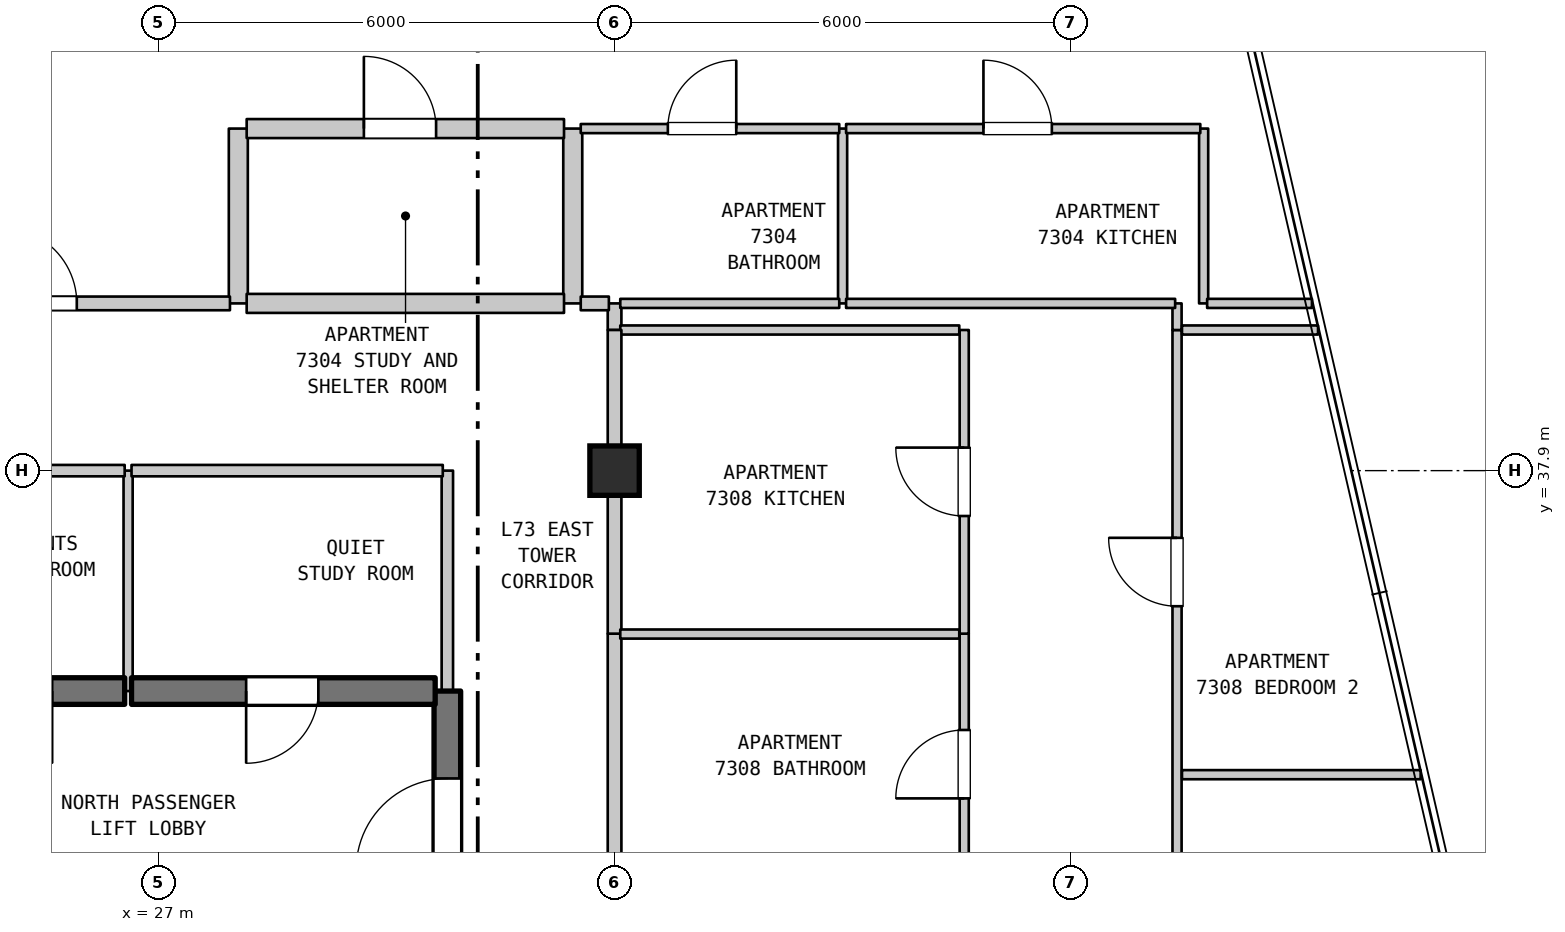
"""IFC4 building model, lengths in metres.
Left out: names, types, materials, properties, quantities, classifications, styles, units other than length and angle.
Written with IfcOpenShell. Run it as: python <this file> out.ifc"""

import sys

from ifc_helpers import new_model, si_unit, direction, frame, frame_2d, origin, origin_2d, place, context, subcontext, project, spatial, rectangle, extrude, element, fill, save


model = new_model("IFC4")
c1 = context("Model", 3, precision=1e-05, world=origin(), true_north=direction((0.0, 1.0)))
c2 = subcontext(c1, "Body", "Model", "MODEL_VIEW")
j1 = project(units=[si_unit("LENGTHUNIT", "METRE"), si_unit("PLANEANGLEUNIT", "RADIAN")], contexts=[c1])
p1 = place(None, origin())
s1 = spatial("IfcSite", under=j1, at=p1, CompositionType="ELEMENT")
p2 = place(p1, origin())
s2 = spatial("IfcBuilding", under=s1, at=p2, CompositionType="ELEMENT")
p3 = place(p2, frame((0.0, 0.0, 291.7)))
s3 = spatial("IfcBuildingStorey", under=s2, at=p3, CompositionType="ELEMENT", Elevation=291.7)
p4 = place(p3, frame((33.0, 37.9, 0.0), z_axis=(0.0, 0.0, 1.0), x_axis=(1.0, 0.0, 0.0)))
e1 = element("IfcColumn", 1, at=p4, inside=s3, PredefinedType="COLUMN", context=c2, shape_type="SweptSolid", body=[
    extrude(rectangle(XDim=0.65, YDim=0.65, at=origin_2d()), origin(), (0.0, 0.0, 1.0), 3.7),
])
p5 = place(p3, frame((26.6, 35.0, 0.0), z_axis=(0.0, 0.0, 1.0), x_axis=(0.0, 1.0, 0.0)))
e2 = element("IfcWall", 2, at=p5, inside=s3, PredefinedType="PARTITIONING", context=c2, shape_type="SweptSolid", body=[
    extrude(rectangle(XDim=2.9, YDim=0.12, at=frame_2d((1.45, 0.0))), origin(), (0.0, 0.0, 1.0), 3.39),
])
p6 = place(p3, frame((28.05, 40.1, 0.0), z_axis=(0.0, 0.0, 1.0), x_axis=(0.0, 1.0, 0.0)))
e3 = element("IfcWall", 3, at=p6, inside=s3, PredefinedType="STANDARD", context=c2, shape_type="SweptSolid", body=[
    extrude(rectangle(XDim=2.3, YDim=0.25, at=frame_2d((1.15, 0.0))), origin(), (0.0, 0.0, 1.0), 3.39),
])
p7 = place(p3, frame((30.8, 31.5, 0.0), z_axis=(0.0, 0.0, 1.0), x_axis=(0.0, 1.0, 0.0)))
e4 = element("IfcWall", 4, at=p7, inside=s3, PredefinedType="SHEAR", context=c2, shape_type="SweptSolid", body=[
    extrude(rectangle(XDim=3.5, YDim=0.35, at=frame_2d((1.75, 0.0))), origin(), (0.0, 0.0, 1.0), 3.39),
])
p8 = place(p7, frame((1.15, 0.0, 0.0)))
e5 = element("IfcOpeningElement", 5, at=p8, cuts=e4, PredefinedType="OPENING", context=c2, shape_type="SweptSolid", body=[
    extrude(rectangle(XDim=1.2, YDim=2.2, at=frame_2d((0.6, 1.1))), frame((0.0, 0.185, 0.0), z_axis=(0.0, -1.0, 0.0), x_axis=(1.0, 0.0, 0.0)), (0.0, 0.0, 1.0), 0.37),
])
p9 = place(p3, frame((30.8, 35.0, 0.0), z_axis=(0.0, 0.0, 1.0), x_axis=(0.0, 1.0, 0.0)))
e6 = element("IfcWall", 6, at=p9, inside=s3, PredefinedType="STANDARD", context=c2, shape_type="SweptSolid", body=[
    extrude(rectangle(XDim=2.9, YDim=0.15, at=frame_2d((1.45, 0.0))), origin(), (0.0, 0.0, 1.0), 3.39),
])
p10 = place(p3, frame((32.45, 40.1, 0.0), z_axis=(0.0, 0.0, 1.0), x_axis=(0.0, 1.0, 0.0)))
e7 = element("IfcWall", 7, at=p10, inside=s3, PredefinedType="STANDARD", context=c2, shape_type="SweptSolid", body=[
    extrude(rectangle(XDim=2.3, YDim=0.25, at=frame_2d((1.15, 0.0))), origin(), (0.0, 0.0, 1.0), 3.39),
])
p11 = place(p3, frame((33.0, 32.465, 0.0), z_axis=(0.0, 0.0, 1.0), x_axis=(0.0, 1.0, 0.0)))
e8 = element("IfcWall", 8, at=p11, inside=s3, PredefinedType="STANDARD", context=c2, shape_type="SweptSolid", body=[
    extrude(rectangle(XDim=3.29, YDim=0.18, at=frame_2d((1.645, 0.0))), origin(), (0.0, 0.0, 1.0), 2.89),
])
p12 = place(p3, frame((33.0, 35.755, 0.0), z_axis=(0.0, 0.0, 1.0), x_axis=(0.0, 1.0, 0.0)))
e9 = element("IfcWall", 9, at=p12, inside=s3, PredefinedType="STANDARD", context=c2, shape_type="SweptSolid", body=[
    extrude(rectangle(XDim=2.145, YDim=0.18, at=frame_2d((1.073, 0.0))), origin(), (0.0, 0.0, 1.0), 2.89),
])
p13 = place(p3, frame((33.0, 39.75, 0.0), z_axis=(0.0, 0.0, 1.0), x_axis=(0.0, 1.0, 0.0)))
e10 = element("IfcWall", 10, at=p13, inside=s3, PredefinedType="STANDARD", context=c2, shape_type="SweptSolid", body=[
    extrude(rectangle(XDim=0.35, YDim=0.18, at=frame_2d((0.175, 0.0))), origin(), (0.0, 0.0, 1.0), 3.39),
])
p14 = place(p3, frame((36.0, 40.1, 0.0), z_axis=(0.0, 0.0, 1.0), x_axis=(0.0, 1.0, 0.0)))
e11 = element("IfcWall", 11, at=p14, inside=s3, PredefinedType="PARTITIONING", context=c2, shape_type="SweptSolid", body=[
    extrude(rectangle(XDim=2.3, YDim=0.12, at=frame_2d((1.15, 0.0))), origin(), (0.0, 0.0, 1.0), 3.39),
])
p15 = place(p3, frame((37.6, 32.465, 0.0), z_axis=(0.0, 0.0, 1.0), x_axis=(0.0, 1.0, 0.0)))
e12 = element("IfcWall", 12, at=p15, inside=s3, PredefinedType="PARTITIONING", context=c2, shape_type="SweptSolid", body=[
    extrude(rectangle(XDim=3.29, YDim=0.12, at=frame_2d((1.645, 0.0))), origin(), (0.0, 0.0, 1.0), 3.39),
])
p16 = place(p15, frame((1.123, 0.0, 0.0)))
e13 = element("IfcOpeningElement", 13, at=p16, cuts=e12, PredefinedType="OPENING", context=c2, shape_type="SweptSolid", body=[
    extrude(rectangle(XDim=0.9, YDim=2.1, at=frame_2d((0.45, 1.05))), frame((0.0, 0.07, 0.0), z_axis=(0.0, -1.0, 0.0), x_axis=(1.0, 0.0, 0.0)), (0.0, 0.0, 1.0), 0.14),
])
p17 = place(p3, frame((37.6, 35.755, 0.0), z_axis=(0.0, 0.0, 1.0), x_axis=(0.0, 1.0, 0.0)))
e14 = element("IfcWall", 14, at=p17, inside=s3, PredefinedType="PARTITIONING", context=c2, shape_type="SweptSolid", body=[
    extrude(rectangle(XDim=3.995, YDim=0.12, at=frame_2d((1.998, 0.0))), origin(), (0.0, 0.0, 1.0), 3.39),
])
p18 = place(p17, frame((1.548, 0.0, 0.0)))
e15 = element("IfcOpeningElement", 15, at=p18, cuts=e14, PredefinedType="OPENING", context=c2, shape_type="SweptSolid", body=[
    extrude(rectangle(XDim=0.9, YDim=2.15, at=frame_2d((0.45, 1.075))), frame((0.0, 0.07, 0.0), z_axis=(0.0, -1.0, 0.0), x_axis=(1.0, 0.0, 0.0)), (0.0, 0.0, 1.0), 0.14),
])
p19 = place(p3, frame((40.4, 28.0, 0.0), z_axis=(0.0, 0.0, 1.0), x_axis=(0.0, 1.0, 0.0)))
e16 = element("IfcWall", 16, at=p19, inside=s3, PredefinedType="PARTITIONING", context=c2, shape_type="SweptSolid", body=[
    extrude(rectangle(XDim=11.75, YDim=0.12, at=frame_2d((5.875, 0.0))), origin(), (0.0, 0.0, 1.0), 3.39),
])
p20 = place(p19, frame((2.591, 0.0, 0.0)))
e17 = element("IfcOpeningElement", 17, at=p20, cuts=e16, PredefinedType="OPENING", context=c2, shape_type="SweptSolid", body=[
    extrude(rectangle(XDim=0.9, YDim=2.15, at=frame_2d((0.45, 1.075))), frame((0.0, 0.07, 0.0), z_axis=(0.0, -1.0, 0.0), x_axis=(1.0, 0.0, 0.0)), (0.0, 0.0, 1.0), 0.14),
])
p21 = place(p19, frame((8.116, 0.0, 0.0)))
e18 = element("IfcOpeningElement", 18, at=p21, cuts=e16, PredefinedType="OPENING", context=c2, shape_type="SweptSolid", body=[
    extrude(rectangle(XDim=0.9, YDim=2.15, at=frame_2d((0.45, 1.075))), frame((0.0, 0.07, 0.0), z_axis=(0.0, -1.0, 0.0), x_axis=(1.0, 0.0, 0.0)), (0.0, 0.0, 1.0), 0.14),
])
p22 = place(p3, frame((40.4, 39.75, 0.0), z_axis=(0.0, 0.0, 1.0), x_axis=(0.0, 1.0, 0.0)))
e19 = element("IfcWall", 19, at=p22, inside=s3, PredefinedType="PARTITIONING", context=c2, shape_type="SweptSolid", body=[
    extrude(rectangle(XDim=0.35, YDim=0.12, at=frame_2d((0.175, 0.0))), origin(), (0.0, 0.0, 1.0), 3.39),
])
p23 = place(p3, frame((40.75, 40.1, 0.0), z_axis=(0.0, 0.0, 1.0), x_axis=(0.0, 1.0, 0.0)))
e20 = element("IfcWall", 20, at=p23, inside=s3, PredefinedType="PARTITIONING", context=c2, shape_type="SweptSolid", body=[
    extrude(rectangle(XDim=2.3, YDim=0.12, at=frame_2d((1.15, 0.0))), origin(), (0.0, 0.0, 1.0), 3.39),
])
p24 = place(p3, frame((40.465, 33.9, 0.0), z_axis=(0.0, 0.0, 1.0), x_axis=(1.0, 0.0, 0.0)))
e21 = element("IfcWall", 21, at=p24, inside=s3, PredefinedType="PARTITIONING", context=c2, shape_type="SweptSolid", body=[
    extrude(rectangle(XDim=3.14, YDim=0.12, at=frame_2d((1.57, 0.0))), origin(), (0.0, 0.0, 1.0), 3.39),
])
p25 = place(p3, frame((23.96, 35.0, 0.0), z_axis=(0.0, 0.0, 1.0), x_axis=(1.0, 0.0, 0.0)))
e22 = element("IfcWall", 22, at=p25, inside=s3, PredefinedType="SHEAR", context=c2, shape_type="SweptSolid", body=[
    extrude(rectangle(XDim=2.595, YDim=0.35, at=frame_2d((1.297, 0.0))), origin(), (0.0, 0.0, 1.0), 3.39),
])
p26 = place(p25, frame((0.691, 0.0, 0.0)))
e23 = element("IfcOpeningElement", 23, at=p26, cuts=e22, PredefinedType="OPENING", context=c2, shape_type="SweptSolid", body=[
    extrude(rectangle(XDim=0.95, YDim=2.15, at=frame_2d((0.475, 1.075))), frame((0.0, 0.185, 0.0), z_axis=(0.0, -1.0, 0.0), x_axis=(1.0, 0.0, 0.0)), (0.0, 0.0, 1.0), 0.37),
])
p27 = place(p3, frame((26.645, 35.0, 0.0), z_axis=(0.0, 0.0, 1.0), x_axis=(1.0, 0.0, 0.0)))
e24 = element("IfcWall", 24, at=p27, inside=s3, PredefinedType="SHEAR", context=c2, shape_type="SweptSolid", body=[
    extrude(rectangle(XDim=3.995, YDim=0.35, at=frame_2d((1.998, 0.0))), origin(), (0.0, 0.0, 1.0), 3.39),
])
p28 = place(p27, frame((1.508, 0.0, 0.0)))
e25 = element("IfcOpeningElement", 25, at=p28, cuts=e24, PredefinedType="OPENING", context=c2, shape_type="SweptSolid", body=[
    extrude(rectangle(XDim=0.95, YDim=2.15, at=frame_2d((0.475, 1.075))), frame((0.0, 0.185, 0.0), z_axis=(0.0, -1.0, 0.0), x_axis=(1.0, 0.0, 0.0)), (0.0, 0.0, 1.0), 0.37),
])
p29 = place(p3, frame((33.075, 35.75, 0.0), z_axis=(0.0, 0.0, 1.0), x_axis=(1.0, 0.0, 0.0)))
e26 = element("IfcWall", 26, at=p29, inside=s3, PredefinedType="PARTITIONING", context=c2, shape_type="SweptSolid", body=[
    extrude(rectangle(XDim=4.46, YDim=0.12, at=frame_2d((2.23, 0.0))), origin(), (0.0, 0.0, 1.0), 3.39),
])
p30 = place(p3, frame((23.96, 37.9, 0.0), z_axis=(0.0, 0.0, 1.0), x_axis=(1.0, 0.0, 0.0)))
e27 = element("IfcWall", 27, at=p30, inside=s3, PredefinedType="STANDARD", context=c2, shape_type="SweptSolid", body=[
    extrude(rectangle(XDim=2.595, YDim=0.15, at=frame_2d((1.297, 0.0))), origin(), (0.0, 0.0, 1.0), 2.89),
])
p31 = place(p3, frame((26.645, 37.9, 0.0), z_axis=(0.0, 0.0, 1.0), x_axis=(1.0, 0.0, 0.0)))
e28 = element("IfcWall", 28, at=p31, inside=s3, PredefinedType="STANDARD", context=c2, shape_type="SweptSolid", body=[
    extrude(rectangle(XDim=4.095, YDim=0.15, at=frame_2d((2.047, 0.0))), origin(), (0.0, 0.0, 1.0), 2.89),
])
p32 = place(p3, frame((33.075, 39.75, 0.0), z_axis=(0.0, 0.0, 1.0), x_axis=(1.0, 0.0, 0.0)))
e29 = element("IfcWall", 29, at=p32, inside=s3, PredefinedType="PARTITIONING", context=c2, shape_type="SweptSolid", body=[
    extrude(rectangle(XDim=4.46, YDim=0.12, at=frame_2d((2.23, 0.0))), origin(), (0.0, 0.0, 1.0), 3.39),
])
p33 = place(p3, frame((40.465, 39.75, 0.0), z_axis=(0.0, 0.0, 1.0), x_axis=(1.0, 0.0, 0.0)))
e30 = element("IfcWall", 30, at=p33, inside=s3, PredefinedType="PARTITIONING", context=c2, shape_type="SweptSolid", body=[
    extrude(rectangle(XDim=1.79, YDim=0.12, at=frame_2d((0.895, 0.0))), origin(), (0.0, 0.0, 1.0), 3.39),
])
p34 = place(p3, frame((22.845, 40.1, 0.0), z_axis=(0.0, 0.0, 1.0), x_axis=(1.0, 0.0, 0.0)))
e31 = element("IfcWall", 31, at=p34, inside=s3, PredefinedType="STANDARD", context=c2, shape_type="SweptSolid", body=[
    extrude(rectangle(XDim=5.095, YDim=0.18, at=frame_2d((2.547, 0.0))), origin(), (0.0, 0.0, 1.0), 3.39),
])
p35 = place(p34, frame((2.08, 0.0, 0.0)))
e32 = element("IfcOpeningElement", 32, at=p35, cuts=e31, PredefinedType="OPENING", context=c2, shape_type="SweptSolid", body=[
    extrude(rectangle(XDim=1.0, YDim=2.15, at=frame_2d((0.5, 1.075))), frame((0.0, 0.1, 0.0), z_axis=(0.0, -1.0, 0.0), x_axis=(1.0, 0.0, 0.0)), (0.0, 0.0, 1.0), 0.2),
])
p36 = place(p3, frame((28.16, 40.1, 0.0), z_axis=(0.0, 0.0, 1.0), x_axis=(1.0, 0.0, 0.0)))
e33 = element("IfcWall", 33, at=p36, inside=s3, PredefinedType="STANDARD", context=c2, shape_type="SweptSolid", body=[
    extrude(rectangle(XDim=4.175, YDim=0.25, at=frame_2d((2.087, 0.0))), origin(), (0.0, 0.0, 1.0), 3.39),
])
p37 = place(p3, frame((32.555, 40.1, 0.0), z_axis=(0.0, 0.0, 1.0), x_axis=(1.0, 0.0, 0.0)))
e34 = element("IfcWall", 34, at=p37, inside=s3, PredefinedType="STANDARD", context=c2, shape_type="SweptSolid", body=[
    extrude(rectangle(XDim=0.37, YDim=0.18, at=frame_2d((0.185, 0.0))), origin(), (0.0, 0.0, 1.0), 3.39),
])
p38 = place(p3, frame((33.075, 40.1, 0.0), z_axis=(0.0, 0.0, 1.0), x_axis=(1.0, 0.0, 0.0)))
e35 = element("IfcWall", 35, at=p38, inside=s3, PredefinedType="PARTITIONING", context=c2, shape_type="SweptSolid", body=[
    extrude(rectangle(XDim=2.881, YDim=0.12, at=frame_2d((1.44, 0.0))), origin(), (0.0, 0.0, 1.0), 3.39),
])
p39 = place(p3, frame((36.046, 40.1, 0.0), z_axis=(0.0, 0.0, 1.0), x_axis=(1.0, 0.0, 0.0)))
e36 = element("IfcWall", 36, at=p39, inside=s3, PredefinedType="PARTITIONING", context=c2, shape_type="SweptSolid", body=[
    extrude(rectangle(XDim=4.329, YDim=0.12, at=frame_2d((2.165, 0.0))), origin(), (0.0, 0.0, 1.0), 3.39),
])
p40 = place(p3, frame((40.796, 40.1, 0.0), z_axis=(0.0, 0.0, 1.0), x_axis=(1.0, 0.0, 0.0)))
e37 = element("IfcWall", 37, at=p40, inside=s3, PredefinedType="PARTITIONING", context=c2, shape_type="SweptSolid", body=[
    extrude(rectangle(XDim=1.379, YDim=0.12, at=frame_2d((0.689, 0.0))), origin(), (0.0, 0.0, 1.0), 3.39),
])
p41 = place(p3, frame((28.16, 42.4, 0.0), z_axis=(0.0, 0.0, 1.0), x_axis=(1.0, 0.0, 0.0)))
e38 = element("IfcWall", 38, at=p41, inside=s3, PredefinedType="STANDARD", context=c2, shape_type="SweptSolid", body=[
    extrude(rectangle(XDim=4.175, YDim=0.25, at=frame_2d((2.087, 0.0))), origin(), (0.0, 0.0, 1.0), 3.39),
])
p42 = place(p41, frame((1.542, 0.0, 0.0)))
e39 = element("IfcOpeningElement", 39, at=p42, cuts=e38, PredefinedType="OPENING", context=c2, shape_type="SweptSolid", body=[
    extrude(rectangle(XDim=0.95, YDim=2.15, at=frame_2d((0.475, 1.075))), frame((0.0, 0.135, 0.0), z_axis=(0.0, -1.0, 0.0), x_axis=(1.0, 0.0, 0.0)), (0.0, 0.0, 1.0), 0.27),
])
p43 = place(p3, frame((32.555, 42.4, 0.0), z_axis=(0.0, 0.0, 1.0), x_axis=(1.0, 0.0, 0.0)))
e40 = element("IfcWall", 40, at=p43, inside=s3, PredefinedType="PARTITIONING", context=c2, shape_type="SweptSolid", body=[
    extrude(rectangle(XDim=3.401, YDim=0.12, at=frame_2d((1.701, 0.0))), origin(), (0.0, 0.0, 1.0), 3.39),
])
p44 = place(p43, frame((1.146, 0.0, 0.0)))
e41 = element("IfcOpeningElement", 41, at=p44, cuts=e40, PredefinedType="OPENING", context=c2, shape_type="SweptSolid", body=[
    extrude(rectangle(XDim=0.9, YDim=2.1, at=frame_2d((0.45, 1.05))), frame((0.0, 0.07, 0.0), z_axis=(0.0, -1.0, 0.0), x_axis=(1.0, 0.0, 0.0)), (0.0, 0.0, 1.0), 0.14),
])
p45 = place(p3, frame((36.046, 42.4, 0.0), z_axis=(0.0, 0.0, 1.0), x_axis=(1.0, 0.0, 0.0)))
e42 = element("IfcWall", 42, at=p45, inside=s3, PredefinedType="PARTITIONING", context=c2, shape_type="SweptSolid", body=[
    extrude(rectangle(XDim=4.66, YDim=0.12, at=frame_2d((2.33, 0.0))), origin(), (0.0, 0.0, 1.0), 3.39),
])
p46 = place(p45, frame((1.807, 0.0, 0.0)))
e43 = element("IfcOpeningElement", 43, at=p46, cuts=e42, PredefinedType="OPENING", context=c2, shape_type="SweptSolid", body=[
    extrude(rectangle(XDim=0.9, YDim=2.15, at=frame_2d((0.45, 1.075))), frame((0.0, 0.07, 0.0), z_axis=(0.0, -1.0, 0.0), x_axis=(1.0, 0.0, 0.0)), (0.0, 0.0, 1.0), 0.14),
])
p47 = place(p3, frame((33.0, 37.9, 0.0), z_axis=(0.0, 0.0, 1.0), x_axis=(0.0, 1.0, 0.0)))
e44 = element("IfcWall", 44, at=p47, inside=s3, PredefinedType="STANDARD", context=c2, shape_type="SweptSolid", body=[
    extrude(rectangle(XDim=1.85, YDim=0.18, at=frame_2d((0.925, 0.0))), origin(), (0.0, 0.0, 1.0), 2.79),
])
p48 = place(p8, origin())
e45 = element("IfcDoor", 45, at=p48, inside=s3, OperationType="SINGLE_SWING_LEFT", PredefinedType="DOOR", context=c2, shape_type="SweptSolid", body=[
    extrude(rectangle(XDim=1.2, YDim=2.2, at=frame_2d((0.6, 1.1))), frame((0.0, 0.025, 0.0), z_axis=(0.0, -1.0, 0.0), x_axis=(1.0, 0.0, 0.0)), (0.0, 0.0, 1.0), 0.05),
])
fill(e5, e45)
p49 = place(p16, origin())
e46 = element("IfcDoor", 46, at=p49, inside=s3, OperationType="SINGLE_SWING_LEFT", PredefinedType="DOOR", context=c2, shape_type="SweptSolid", body=[
    extrude(rectangle(XDim=0.9, YDim=2.1, at=frame_2d((0.45, 1.05))), frame((0.0, 0.025, 0.0), z_axis=(0.0, -1.0, 0.0), x_axis=(1.0, 0.0, 0.0)), (0.0, 0.0, 1.0), 0.05),
])
fill(e13, e46)
p50 = place(p18, origin())
e47 = element("IfcDoor", 47, at=p50, inside=s3, OperationType="SINGLE_SWING_RIGHT", PredefinedType="DOOR", context=c2, shape_type="SweptSolid", body=[
    extrude(rectangle(XDim=0.9, YDim=2.15, at=frame_2d((0.45, 1.075))), frame((0.0, 0.025, 0.0), z_axis=(0.0, -1.0, 0.0), x_axis=(1.0, 0.0, 0.0)), (0.0, 0.0, 1.0), 0.05),
])
fill(e15, e47)
p51 = place(p21, origin())
e48 = element("IfcDoor", 48, at=p51, inside=s3, OperationType="SINGLE_SWING_RIGHT", PredefinedType="DOOR", context=c2, shape_type="SweptSolid", body=[
    extrude(rectangle(XDim=0.9, YDim=2.15, at=frame_2d((0.45, 1.075))), frame((0.0, 0.025, 0.0), z_axis=(0.0, -1.0, 0.0), x_axis=(1.0, 0.0, 0.0)), (0.0, 0.0, 1.0), 0.05),
])
fill(e18, e48)
p52 = place(p26, frame((0.95, 0.0, 0.0), z_axis=(0.0, 0.0, 1.0), x_axis=(-1.0, 0.0, 0.0)))
e49 = element("IfcDoor", 49, at=p52, inside=s3, OperationType="SINGLE_SWING_RIGHT", PredefinedType="DOOR", context=c2, shape_type="SweptSolid", body=[
    extrude(rectangle(XDim=0.95, YDim=2.15, at=frame_2d((0.475, 1.075))), frame((0.0, 0.025, 0.0), z_axis=(0.0, -1.0, 0.0), x_axis=(1.0, 0.0, 0.0)), (0.0, 0.0, 1.0), 0.05),
])
fill(e23, e49)
p53 = place(p28, frame((0.95, 0.0, 0.0), z_axis=(0.0, 0.0, 1.0), x_axis=(-1.0, 0.0, 0.0)))
e50 = element("IfcDoor", 50, at=p53, inside=s3, OperationType="SINGLE_SWING_LEFT", PredefinedType="DOOR", context=c2, shape_type="SweptSolid", body=[
    extrude(rectangle(XDim=0.95, YDim=2.15, at=frame_2d((0.475, 1.075))), frame((0.0, 0.025, 0.0), z_axis=(0.0, -1.0, 0.0), x_axis=(1.0, 0.0, 0.0)), (0.0, 0.0, 1.0), 0.05),
])
fill(e25, e50)
p54 = place(p35, origin())
e51 = element("IfcDoor", 51, at=p54, inside=s3, OperationType="SINGLE_SWING_LEFT", PredefinedType="DOOR", context=c2, shape_type="SweptSolid", body=[
    extrude(rectangle(XDim=1.0, YDim=2.15, at=frame_2d((0.5, 1.075))), frame((0.0, 0.025, 0.0), z_axis=(0.0, -1.0, 0.0), x_axis=(1.0, 0.0, 0.0)), (0.0, 0.0, 1.0), 0.05),
])
fill(e32, e51)
p55 = place(p42, origin())
e52 = element("IfcDoor", 52, at=p55, inside=s3, OperationType="SINGLE_SWING_LEFT", PredefinedType="DOOR", context=c2, shape_type="SweptSolid", body=[
    extrude(rectangle(XDim=0.95, YDim=2.15, at=frame_2d((0.475, 1.075))), frame((0.0, 0.025, 0.0), z_axis=(0.0, -1.0, 0.0), x_axis=(1.0, 0.0, 0.0)), (0.0, 0.0, 1.0), 0.05),
])
fill(e39, e52)
p56 = place(p44, origin())
e53 = element("IfcDoor", 53, at=p56, inside=s3, OperationType="SINGLE_SWING_RIGHT", PredefinedType="DOOR", context=c2, shape_type="SweptSolid", body=[
    extrude(rectangle(XDim=0.9, YDim=2.1, at=frame_2d((0.45, 1.05))), frame((0.0, 0.025, 0.0), z_axis=(0.0, -1.0, 0.0), x_axis=(1.0, 0.0, 0.0)), (0.0, 0.0, 1.0), 0.05),
])
fill(e41, e53)
p57 = place(p46, origin())
e54 = element("IfcDoor", 54, at=p57, inside=s3, OperationType="SINGLE_SWING_LEFT", PredefinedType="DOOR", context=c2, shape_type="SweptSolid", body=[
    extrude(rectangle(XDim=0.9, YDim=2.15, at=frame_2d((0.45, 1.075))), frame((0.0, 0.025, 0.0), z_axis=(0.0, -1.0, 0.0), x_axis=(1.0, 0.0, 0.0)), (0.0, 0.0, 1.0), 0.05),
])
fill(e43, e54)
save(model, sys.argv[1])
